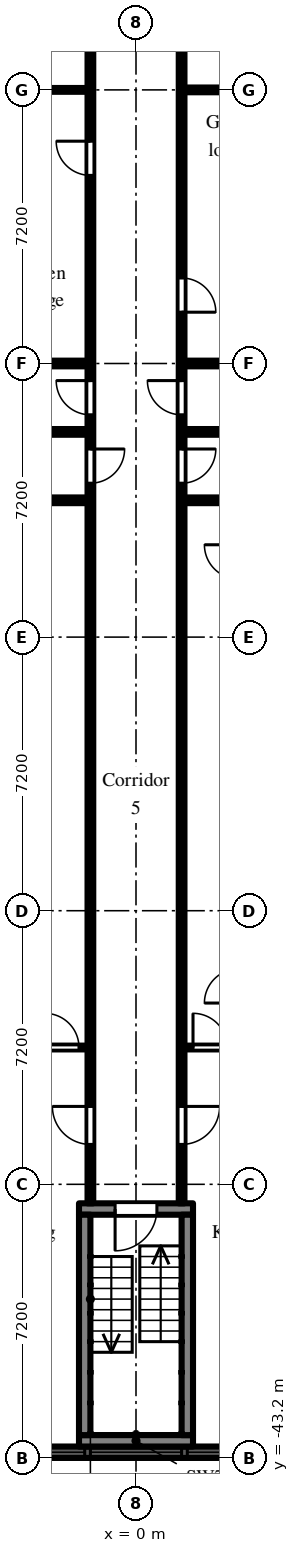
"""IFC4 building model, lengths in metres.
Left out: names, types, materials, properties, quantities, classifications, styles, units other than length and angle.
Written with IfcOpenShell. Run it as: python <this file> out.ifc"""

import sys

from ifc_helpers import new_model, si_unit, direction, frame, frame_2d, origin, place, context, subcontext, project, spatial, rectangle, extrude, element, fill, save


model = new_model("IFC4")
c1 = context("Model", 3, precision=1e-05, world=origin(), true_north=direction((0.0, 1.0)))
c2 = subcontext(c1, "Body", "Model", "MODEL_VIEW")
j1 = project(units=[si_unit("LENGTHUNIT", "METRE"), si_unit("PLANEANGLEUNIT", "RADIAN")], contexts=[c1])
p1 = place(None, origin())
s1 = spatial("IfcSite", under=j1, at=p1, CompositionType="ELEMENT")
p2 = place(p1, origin())
s2 = spatial("IfcBuilding", under=s1, at=p2, CompositionType="ELEMENT")
p3 = place(p2, frame((0.0, 0.0, 108.9)))
s3 = spatial("IfcBuildingStorey", under=s2, at=p3, CompositionType="ELEMENT", Elevation=108.9)
p4 = place(p3, frame((-2.7, -43.05, 0.0), z_axis=(0.0, 0.0, 1.0), x_axis=(1.0, 0.0, 0.0)))
e1 = element("IfcWall", 1, at=p4, inside=s3, PredefinedType="SOLIDWALL", context=c2, shape_type="SweptSolid", body=[
    extrude(rectangle(XDim=5.4, YDim=0.3, at=frame_2d((2.7, 0.0))), origin(), (0.0, 0.0, 1.0), 2.2),
])
p5 = place(p4, frame((1.5, 0.0, 0.2)))
e2 = element("IfcOpeningElement", 2, at=p5, cuts=e1, PredefinedType="OPENING", context=c2, shape_type="SweptSolid", body=[
    extrude(rectangle(XDim=2.4, YDim=1.85, at=frame_2d((1.2, 0.925))), frame((0.0, 0.16, 0.0), z_axis=(0.0, -1.0, 0.0), x_axis=(1.0, 0.0, 0.0)), (0.0, 0.0, 1.0), 0.32),
])
p6 = place(p4, frame((0.15, 0.0, 0.2)))
e3 = element("IfcOpeningElement", 3, at=p6, cuts=e1, PredefinedType="OPENING", context=c2, shape_type="SweptSolid", body=[
    extrude(rectangle(XDim=1.2, YDim=1.85, at=frame_2d((0.6, 0.925))), frame((0.0, 0.16, 0.0), z_axis=(0.0, -1.0, 0.0), x_axis=(1.0, 0.0, 0.0)), (0.0, 0.0, 1.0), 0.32),
])
p7 = place(p4, frame((4.05, 0.0, 0.2)))
e4 = element("IfcOpeningElement", 4, at=p7, cuts=e1, PredefinedType="OPENING", context=c2, shape_type="SweptSolid", body=[
    extrude(rectangle(XDim=1.2, YDim=1.85, at=frame_2d((0.6, 0.925))), frame((0.0, 0.16, 0.0), z_axis=(0.0, -1.0, 0.0), x_axis=(1.0, 0.0, 0.0)), (0.0, 0.0, 1.0), 0.32),
])
p8 = place(p3, frame((-1.5, -36.65, 0.0), z_axis=(0.0, 0.0, 1.0), x_axis=(1.0, 0.0, 0.0)))
e5 = element("IfcWall", 5, at=p8, inside=s3, PredefinedType="SHEAR", context=c2, shape_type="SweptSolid", body=[
    extrude(rectangle(XDim=3.0, YDim=0.3, at=frame_2d((1.5, 0.0))), origin(), (0.0, 0.0, 1.0), 2.55),
])
p9 = place(p8, frame((0.95, 0.0, 0.0)))
e6 = element("IfcOpeningElement", 6, at=p9, cuts=e5, PredefinedType="OPENING", context=c2, shape_type="SweptSolid", body=[
    extrude(rectangle(XDim=1.1, YDim=2.1, at=frame_2d((0.55, 1.05))), frame((0.0, 0.16, 0.0), z_axis=(0.0, -1.0, 0.0), x_axis=(1.0, 0.0, 0.0)), (0.0, 0.0, 1.0), 0.32),
])
p10 = place(p3, frame((-1.5, -42.75, 0.0), z_axis=(0.0, 0.0, 1.0), x_axis=(1.0, 0.0, 0.0)))
e7 = element("IfcWall", 7, at=p10, inside=s3, PredefinedType="SHEAR", context=c2, shape_type="SweptSolid", body=[
    extrude(rectangle(XDim=3.0, YDim=0.3, at=frame_2d((1.5, 0.0))), origin(), (0.0, 0.0, 1.0), 2.55),
])
for number, where, z_axis, x_axis in (
    (8, (-1.35, -36.8, 0.0), (0.0, 0.0, 1.0), (0.0, -1.0, 0.0)),
    (9, (1.35, -36.8, 0.0), (0.0, 0.0, 1.0), (0.0, -1.0, 0.0)),
):
    element("IfcWall", number, at=place(p3, frame(where, z_axis=z_axis, x_axis=x_axis)), inside=s3, PredefinedType="SHEAR", context=c2, shape_type="SweptSolid", body=[
        extrude(rectangle(XDim=5.8, YDim=0.3, at=frame_2d((2.9, 0.0))), origin(), (0.0, 0.0, 1.0), 2.55),
    ])
p11 = place(p3, frame((-6.9, -32.4, 0.0), z_axis=(0.0, 0.0, 1.0), x_axis=(1.0, 0.0, 0.0)))
e10 = element("IfcWall", 10, at=p11, inside=s3, PredefinedType="PARTITIONING", context=c2, shape_type="SweptSolid", body=[
    extrude(rectangle(XDim=5.625, YDim=0.1, at=frame_2d((2.812, 0.0))), origin(), (0.0, 0.0, 1.0), 2.55),
])
p12 = place(p11, frame((4.5, 0.0, 0.0)))
e11 = element("IfcOpeningElement", 11, at=p12, cuts=e10, PredefinedType="OPENING", context=c2, shape_type="SweptSolid", body=[
    extrude(rectangle(XDim=0.9, YDim=2.1, at=frame_2d((0.45, 1.05))), frame((0.0, 0.06, 0.0), z_axis=(0.0, -1.0, 0.0), x_axis=(1.0, 0.0, 0.0)), (0.0, 0.0, 1.0), 0.12),
])
for number, where, z_axis, x_axis in (
    (12, (-6.9, -18.0, 0.0), (0.0, 0.0, 1.0), (1.0, 0.0, 0.0)),
    (13, (-6.9, -16.2, 0.0), (0.0, 0.0, 1.0), (1.0, 0.0, 0.0)),
):
    element("IfcWall", number, at=place(p3, frame(where, z_axis=z_axis, x_axis=x_axis)), inside=s3, PredefinedType="PARTITIONING", context=c2, shape_type="SweptSolid", body=[
        extrude(rectangle(XDim=5.625, YDim=0.15, at=frame_2d((2.812, 0.0))), origin(), (0.0, 0.0, 1.0), 2.55),
    ])
p13 = place(p3, frame((-3.9, -14.4, 0.0), z_axis=(0.0, 0.0, 1.0), x_axis=(1.0, 0.0, 0.0)))
e14 = element("IfcWall", 14, at=p13, inside=s3, PredefinedType="PARTITIONING", context=c2, shape_type="SweptSolid", body=[
    extrude(rectangle(XDim=2.625, YDim=0.15, at=frame_2d((1.312, 0.0))), origin(), (0.0, 0.0, 1.0), 2.55),
])
p14 = place(p3, frame((-3.9, -7.2, 0.0), z_axis=(0.0, 0.0, 1.0), x_axis=(1.0, 0.0, 0.0)))
e15 = element("IfcWall", 15, at=p14, inside=s3, PredefinedType="PARTITIONING", context=c2, shape_type="SweptSolid", body=[
    extrude(rectangle(XDim=2.625, YDim=0.1, at=frame_2d((1.312, 0.0))), origin(), (0.0, 0.0, 1.0), 2.55),
])
p15 = place(p3, frame((-1.2, -36.5, 0.0), z_axis=(0.0, 0.0, 1.0), x_axis=(0.0, 1.0, 0.0)))
e16 = element("IfcWall", 16, at=p15, inside=s3, PredefinedType="PARTITIONING", context=c2, shape_type="SweptSolid", body=[
    extrude(rectangle(XDim=35.225, YDim=0.15, at=frame_2d((17.613, 0.0))), origin(), (0.0, 0.0, 1.0), 2.55),
])
p16 = place(p15, frame((31.85, 0.0, 0.0)))
e17 = element("IfcOpeningElement", 17, at=p16, cuts=e16, PredefinedType="OPENING", context=c2, shape_type="SweptSolid", body=[
    extrude(rectangle(XDim=0.9, YDim=2.1, at=frame_2d((0.45, 1.05))), frame((0.0, 0.085, 0.0), z_axis=(0.0, -1.0, 0.0), x_axis=(1.0, 0.0, 0.0)), (0.0, 0.0, 1.0), 0.17),
])
p17 = place(p15, frame((27.05, 0.0, 0.0)))
e18 = element("IfcOpeningElement", 18, at=p17, cuts=e16, PredefinedType="OPENING", context=c2, shape_type="SweptSolid", body=[
    extrude(rectangle(XDim=0.9, YDim=2.1, at=frame_2d((0.45, 1.05))), frame((0.0, 0.085, 0.0), z_axis=(0.0, -1.0, 0.0), x_axis=(1.0, 0.0, 0.0)), (0.0, 0.0, 1.0), 0.17),
])
p18 = place(p15, frame((20.75, 0.0, 0.0)))
e19 = element("IfcOpeningElement", 19, at=p18, cuts=e16, PredefinedType="OPENING", context=c2, shape_type="SweptSolid", body=[
    extrude(rectangle(XDim=0.9, YDim=2.1, at=frame_2d((0.45, 1.05))), frame((0.0, 0.085, 0.0), z_axis=(0.0, -1.0, 0.0), x_axis=(1.0, 0.0, 0.0)), (0.0, 0.0, 1.0), 0.17),
])
p19 = place(p15, frame((18.95, 0.0, 0.0)))
e20 = element("IfcOpeningElement", 20, at=p19, cuts=e16, PredefinedType="OPENING", context=c2, shape_type="SweptSolid", body=[
    extrude(rectangle(XDim=0.9, YDim=2.1, at=frame_2d((0.45, 1.05))), frame((0.0, 0.085, 0.0), z_axis=(0.0, -1.0, 0.0), x_axis=(1.0, 0.0, 0.0)), (0.0, 0.0, 1.0), 0.17),
])
p20 = place(p15, frame((1.55, 0.0, 0.0)))
e21 = element("IfcOpeningElement", 21, at=p20, cuts=e16, PredefinedType="OPENING", context=c2, shape_type="SweptSolid", body=[
    extrude(rectangle(XDim=1.0, YDim=2.1, at=frame_2d((0.5, 1.05))), frame((0.0, 0.085, 0.0), z_axis=(0.0, -1.0, 0.0), x_axis=(1.0, 0.0, 0.0)), (0.0, 0.0, 1.0), 0.17),
])
p21 = place(p3, frame((1.2, -36.5, 0.0), z_axis=(0.0, 0.0, 1.0), x_axis=(0.0, 1.0, 0.0)))
e22 = element("IfcWall", 22, at=p21, inside=s3, PredefinedType="PARTITIONING", context=c2, shape_type="SweptSolid", body=[
    extrude(rectangle(XDim=35.375, YDim=0.15, at=frame_2d((17.688, 0.0))), origin(), (0.0, 0.0, 1.0), 2.55),
])
p22 = place(p21, frame((33.65, 0.0, 0.0)))
e23 = element("IfcOpeningElement", 23, at=p22, cuts=e22, PredefinedType="OPENING", context=c2, shape_type="SweptSolid", body=[
    extrude(rectangle(XDim=0.9, YDim=2.1, at=frame_2d((0.45, 1.05))), frame((0.0, 0.085, 0.0), z_axis=(0.0, -1.0, 0.0), x_axis=(1.0, 0.0, 0.0)), (0.0, 0.0, 1.0), 0.17),
])
p23 = place(p21, frame((30.65, 0.0, 0.0)))
e24 = element("IfcOpeningElement", 24, at=p23, cuts=e22, PredefinedType="OPENING", context=c2, shape_type="SweptSolid", body=[
    extrude(rectangle(XDim=0.9, YDim=2.1, at=frame_2d((0.45, 1.05))), frame((0.0, 0.085, 0.0), z_axis=(0.0, -1.0, 0.0), x_axis=(1.0, 0.0, 0.0)), (0.0, 0.0, 1.0), 0.17),
])
p24 = place(p21, frame((23.45, 0.0, 0.0)))
e25 = element("IfcOpeningElement", 25, at=p24, cuts=e22, PredefinedType="OPENING", context=c2, shape_type="SweptSolid", body=[
    extrude(rectangle(XDim=0.9, YDim=2.1, at=frame_2d((0.45, 1.05))), frame((0.0, 0.085, 0.0), z_axis=(0.0, -1.0, 0.0), x_axis=(1.0, 0.0, 0.0)), (0.0, 0.0, 1.0), 0.17),
])
p25 = place(p21, frame((20.75, 0.0, 0.0)))
e26 = element("IfcOpeningElement", 26, at=p25, cuts=e22, PredefinedType="OPENING", context=c2, shape_type="SweptSolid", body=[
    extrude(rectangle(XDim=0.9, YDim=2.1, at=frame_2d((0.45, 1.05))), frame((0.0, 0.085, 0.0), z_axis=(0.0, -1.0, 0.0), x_axis=(1.0, 0.0, 0.0)), (0.0, 0.0, 1.0), 0.17),
])
p26 = place(p21, frame((18.95, 0.0, 0.0)))
e27 = element("IfcOpeningElement", 27, at=p26, cuts=e22, PredefinedType="OPENING", context=c2, shape_type="SweptSolid", body=[
    extrude(rectangle(XDim=0.9, YDim=2.1, at=frame_2d((0.45, 1.05))), frame((0.0, 0.085, 0.0), z_axis=(0.0, -1.0, 0.0), x_axis=(1.0, 0.0, 0.0)), (0.0, 0.0, 1.0), 0.17),
])
p27 = place(p21, frame((1.55, 0.0, 0.0)))
e28 = element("IfcOpeningElement", 28, at=p27, cuts=e22, PredefinedType="OPENING", context=c2, shape_type="SweptSolid", body=[
    extrude(rectangle(XDim=1.0, YDim=2.1, at=frame_2d((0.5, 1.05))), frame((0.0, 0.085, 0.0), z_axis=(0.0, -1.0, 0.0), x_axis=(1.0, 0.0, 0.0)), (0.0, 0.0, 1.0), 0.17),
])
p28 = place(p3, frame((1.275, -32.4, 0.0), z_axis=(0.0, 0.0, 1.0), x_axis=(1.0, 0.0, 0.0)))
e29 = element("IfcWall", 29, at=p28, inside=s3, PredefinedType="PARTITIONING", context=c2, shape_type="SweptSolid", body=[
    extrude(rectangle(XDim=5.625, YDim=0.1, at=frame_2d((2.812, 0.0))), origin(), (0.0, 0.0, 1.0), 2.55),
])
p29 = place(p28, frame((0.225, 0.0, 0.0)))
e30 = element("IfcOpeningElement", 30, at=p29, cuts=e29, PredefinedType="OPENING", context=c2, shape_type="SweptSolid", body=[
    extrude(rectangle(XDim=0.9, YDim=2.1, at=frame_2d((0.45, 1.05))), frame((0.0, 0.06, 0.0), z_axis=(0.0, -1.0, 0.0), x_axis=(1.0, 0.0, 0.0)), (0.0, 0.0, 1.0), 0.12),
])
for number, where, z_axis, x_axis in (
    (31, (1.275, -18.0, 0.0), (0.0, 0.0, 1.0), (1.0, 0.0, 0.0)),
    (32, (1.275, -16.2, 0.0), (0.0, 0.0, 1.0), (1.0, 0.0, 0.0)),
):
    element("IfcWall", number, at=place(p3, frame(where, z_axis=z_axis, x_axis=x_axis)), inside=s3, PredefinedType="PARTITIONING", context=c2, shape_type="SweptSolid", body=[
        extrude(rectangle(XDim=5.625, YDim=0.15, at=frame_2d((2.812, 0.0))), origin(), (0.0, 0.0, 1.0), 2.55),
    ])
p30 = place(p3, frame((1.275, -14.4, 0.0), z_axis=(0.0, 0.0, 1.0), x_axis=(1.0, 0.0, 0.0)))
e33 = element("IfcWall", 33, at=p30, inside=s3, PredefinedType="PARTITIONING", context=c2, shape_type="SweptSolid", body=[
    extrude(rectangle(XDim=2.625, YDim=0.15, at=frame_2d((1.312, 0.0))), origin(), (0.0, 0.0, 1.0), 2.55),
])
p31 = place(p3, frame((1.275, -7.2, 0.0), z_axis=(0.0, 0.0, 1.0), x_axis=(1.0, 0.0, 0.0)))
e34 = element("IfcWall", 34, at=p31, inside=s3, PredefinedType="PARTITIONING", context=c2, shape_type="SweptSolid", body=[
    extrude(rectangle(XDim=2.625, YDim=0.125, at=frame_2d((1.312, 0.0))), origin(), (0.0, 0.0, 1.0), 2.55),
])
p32 = place(p5, origin())
e35 = element("IfcWindow", 35, at=p32, inside=s3, PartitioningType="SINGLE_PANEL", PredefinedType="WINDOW", context=c2, shape_type="SweptSolid", body=[
    extrude(rectangle(XDim=2.4, YDim=1.85, at=frame_2d((1.2, 0.925))), frame((0.0, 0.03, 0.0), z_axis=(0.0, -1.0, 0.0), x_axis=(1.0, 0.0, 0.0)), (0.0, 0.0, 1.0), 0.06),
])
fill(e2, e35)
p33 = place(p6, origin())
e36 = element("IfcWindow", 36, at=p33, inside=s3, PartitioningType="SINGLE_PANEL", PredefinedType="WINDOW", context=c2, shape_type="SweptSolid", body=[
    extrude(rectangle(XDim=1.2, YDim=1.85, at=frame_2d((0.6, 0.925))), frame((0.0, 0.03, 0.0), z_axis=(0.0, -1.0, 0.0), x_axis=(1.0, 0.0, 0.0)), (0.0, 0.0, 1.0), 0.06),
])
fill(e3, e36)
p34 = place(p7, origin())
e37 = element("IfcWindow", 37, at=p34, inside=s3, PartitioningType="SINGLE_PANEL", PredefinedType="WINDOW", context=c2, shape_type="SweptSolid", body=[
    extrude(rectangle(XDim=1.2, YDim=1.85, at=frame_2d((0.6, 0.925))), frame((0.0, 0.03, 0.0), z_axis=(0.0, -1.0, 0.0), x_axis=(1.0, 0.0, 0.0)), (0.0, 0.0, 1.0), 0.06),
])
fill(e4, e37)
p35 = place(p9, frame((1.1, 0.0, 0.0), z_axis=(0.0, 0.0, 1.0), x_axis=(-1.0, 0.0, 0.0)))
e38 = element("IfcDoor", 38, at=p35, inside=s3, OperationType="SINGLE_SWING_RIGHT", PredefinedType="DOOR", context=c2, shape_type="SweptSolid", body=[
    extrude(rectangle(XDim=1.1, YDim=2.1, at=frame_2d((0.55, 1.05))), frame((0.0, 0.025, 0.0), z_axis=(0.0, -1.0, 0.0), x_axis=(1.0, 0.0, 0.0)), (0.0, 0.0, 1.0), 0.05),
])
fill(e6, e38)
p36 = place(p24, frame((0.9, 0.0, 0.0), z_axis=(0.0, 0.0, 1.0), x_axis=(-1.0, 0.0, 0.0)))
e39 = element("IfcDoor", 39, at=p36, inside=s3, OperationType="SINGLE_SWING_RIGHT", PredefinedType="DOOR", context=c2, shape_type="SweptSolid", body=[
    extrude(rectangle(XDim=0.9, YDim=2.1, at=frame_2d((0.45, 1.05))), frame((0.0, 0.025, 0.0), z_axis=(0.0, -1.0, 0.0), x_axis=(1.0, 0.0, 0.0)), (0.0, 0.0, 1.0), 0.05),
])
fill(e25, e39)
p37 = place(p25, origin())
e40 = element("IfcDoor", 40, at=p37, inside=s3, OperationType="SINGLE_SWING_RIGHT", PredefinedType="DOOR", context=c2, shape_type="SweptSolid", body=[
    extrude(rectangle(XDim=0.9, YDim=2.1, at=frame_2d((0.45, 1.05))), frame((0.0, 0.025, 0.0), z_axis=(0.0, -1.0, 0.0), x_axis=(1.0, 0.0, 0.0)), (0.0, 0.0, 1.0), 0.05),
])
fill(e26, e40)
p38 = place(p26, frame((0.9, 0.0, 0.0), z_axis=(0.0, 0.0, 1.0), x_axis=(-1.0, 0.0, 0.0)))
e41 = element("IfcDoor", 41, at=p38, inside=s3, OperationType="SINGLE_SWING_LEFT", PredefinedType="DOOR", context=c2, shape_type="SweptSolid", body=[
    extrude(rectangle(XDim=0.9, YDim=2.1, at=frame_2d((0.45, 1.05))), frame((0.0, 0.025, 0.0), z_axis=(0.0, -1.0, 0.0), x_axis=(1.0, 0.0, 0.0)), (0.0, 0.0, 1.0), 0.05),
])
fill(e27, e41)
p39 = place(p27, frame((1.0, 0.0, 0.0), z_axis=(0.0, 0.0, 1.0), x_axis=(-1.0, 0.0, 0.0)))
e42 = element("IfcDoor", 42, at=p39, inside=s3, OperationType="SINGLE_SWING_LEFT", PredefinedType="DOOR", context=c2, shape_type="SweptSolid", body=[
    extrude(rectangle(XDim=1.0, YDim=2.1, at=frame_2d((0.5, 1.05))), frame((0.0, 0.025, 0.0), z_axis=(0.0, -1.0, 0.0), x_axis=(1.0, 0.0, 0.0)), (0.0, 0.0, 1.0), 0.05),
])
fill(e28, e42)
p40 = place(p29, origin())
e43 = element("IfcDoor", 43, at=p40, inside=s3, OperationType="SINGLE_SWING_LEFT", PredefinedType="DOOR", context=c2, shape_type="SweptSolid", body=[
    extrude(rectangle(XDim=0.9, YDim=2.1, at=frame_2d((0.45, 1.05))), frame((0.0, 0.025, 0.0), z_axis=(0.0, -1.0, 0.0), x_axis=(1.0, 0.0, 0.0)), (0.0, 0.0, 1.0), 0.05),
])
fill(e30, e43)
p41 = place(p17, origin())
e44 = element("IfcDoor", 44, at=p41, inside=s3, OperationType="SINGLE_SWING_RIGHT", PredefinedType="DOOR", context=c2, shape_type="SweptSolid", body=[
    extrude(rectangle(XDim=0.9, YDim=2.1, at=frame_2d((0.45, 1.05))), frame((0.0, 0.025, 0.0), z_axis=(0.0, -1.0, 0.0), x_axis=(1.0, 0.0, 0.0)), (0.0, 0.0, 1.0), 0.05),
])
fill(e18, e44)
p42 = place(p18, origin())
e45 = element("IfcDoor", 45, at=p42, inside=s3, OperationType="SINGLE_SWING_RIGHT", PredefinedType="DOOR", context=c2, shape_type="SweptSolid", body=[
    extrude(rectangle(XDim=0.9, YDim=2.1, at=frame_2d((0.45, 1.05))), frame((0.0, 0.025, 0.0), z_axis=(0.0, -1.0, 0.0), x_axis=(1.0, 0.0, 0.0)), (0.0, 0.0, 1.0), 0.05),
])
fill(e19, e45)
p43 = place(p19, frame((0.9, 0.0, 0.0), z_axis=(0.0, 0.0, 1.0), x_axis=(-1.0, 0.0, 0.0)))
e46 = element("IfcDoor", 46, at=p43, inside=s3, OperationType="SINGLE_SWING_LEFT", PredefinedType="DOOR", context=c2, shape_type="SweptSolid", body=[
    extrude(rectangle(XDim=0.9, YDim=2.1, at=frame_2d((0.45, 1.05))), frame((0.0, 0.025, 0.0), z_axis=(0.0, -1.0, 0.0), x_axis=(1.0, 0.0, 0.0)), (0.0, 0.0, 1.0), 0.05),
])
fill(e20, e46)
p44 = place(p20, origin())
e47 = element("IfcDoor", 47, at=p44, inside=s3, OperationType="SINGLE_SWING_RIGHT", PredefinedType="DOOR", context=c2, shape_type="SweptSolid", body=[
    extrude(rectangle(XDim=1.0, YDim=2.1, at=frame_2d((0.5, 1.05))), frame((0.0, 0.025, 0.0), z_axis=(0.0, -1.0, 0.0), x_axis=(1.0, 0.0, 0.0)), (0.0, 0.0, 1.0), 0.05),
])
fill(e21, e47)
p45 = place(p12, origin())
e48 = element("IfcDoor", 48, at=p45, inside=s3, OperationType="SINGLE_SWING_LEFT", PredefinedType="DOOR", context=c2, shape_type="SweptSolid", body=[
    extrude(rectangle(XDim=0.9, YDim=2.1, at=frame_2d((0.45, 1.05))), frame((0.0, 0.025, 0.0), z_axis=(0.0, -1.0, 0.0), x_axis=(1.0, 0.0, 0.0)), (0.0, 0.0, 1.0), 0.05),
])
fill(e11, e48)
save(model, sys.argv[1])
